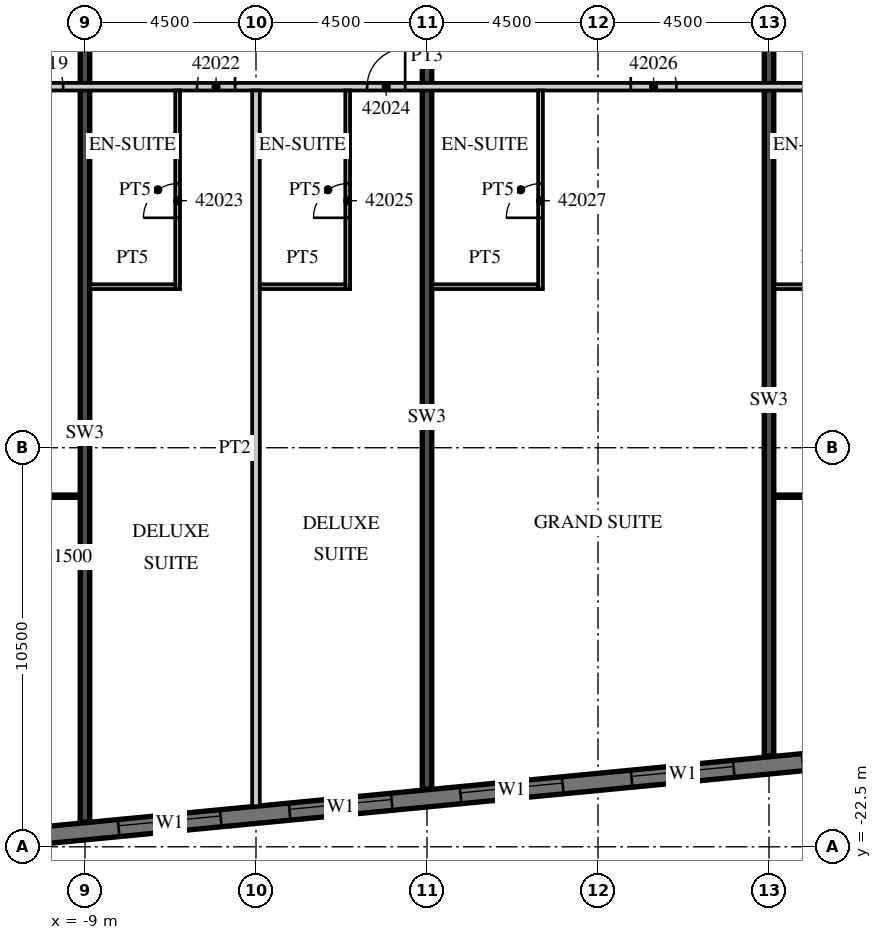
"""IFC4 building model, lengths in metres.
Left out: names, types, materials, properties, quantities, classifications, styles, units other than length and angle.
Written with IfcOpenShell. Run it as: python <this file> out.ifc"""

import sys

from ifc_helpers import new_model, si_unit, direction, frame, frame_2d, origin, place, context, subcontext, project, spatial, rectangle, extrude, element, fill, save


model = new_model("IFC4")
c1 = context("Model", 3, precision=1e-05, world=origin(), true_north=direction((0.0, 1.0)))
c2 = subcontext(c1, "Body", "Model", "MODEL_VIEW")
j1 = project(units=[si_unit("LENGTHUNIT", "METRE"), si_unit("PLANEANGLEUNIT", "RADIAN")], contexts=[c1])
p1 = place(None, origin())
s1 = spatial("IfcSite", under=j1, at=p1, CompositionType="ELEMENT")
p2 = place(p1, origin())
s2 = spatial("IfcBuilding", under=s1, at=p2, CompositionType="ELEMENT")
p3 = place(p2, frame((0.0, 0.0, 180.1)))
s3 = spatial("IfcBuildingStorey", under=s2, at=p3, CompositionType="ELEMENT", Elevation=180.1)
p4 = place(p3, frame((-9.0, -21.845, 0.0), z_axis=(0.0, 0.0, 1.0), x_axis=(0.0, 1.0, 0.0)))
e1 = element("IfcWall", 1, at=p4, inside=s3, PredefinedType="SHEAR", context=c2, shape_type="SweptSolid", body=[
    extrude(rectangle(XDim=20.445, YDim=0.25, at=frame_2d((10.223, 0.0))), origin(), (0.0, 0.0, 1.0), 3.3),
])
p5 = place(p3, frame((0.0, -20.979, 0.0), z_axis=(0.0, 0.0, 1.0), x_axis=(0.0, 1.0, 0.0)))
e2 = element("IfcWall", 2, at=p5, inside=s3, PredefinedType="SHEAR", context=c2, shape_type="SweptSolid", body=[
    extrude(rectangle(XDim=19.579, YDim=0.25, at=frame_2d((9.789, 0.0))), origin(), (0.0, 0.0, 1.0), 3.3),
])
p6 = place(p3, frame((9.0, -20.112, 0.0), z_axis=(0.0, 0.0, 1.0), x_axis=(0.0, 1.0, 0.0)))
e3 = element("IfcWall", 3, at=p6, inside=s3, PredefinedType="SHEAR", context=c2, shape_type="SweptSolid", body=[
    extrude(rectangle(XDim=18.712, YDim=0.25, at=frame_2d((9.356, 0.0))), origin(), (0.0, 0.0, 1.0), 3.3),
])
p7 = place(p3, frame((-13.521, -22.529, 0.0), z_axis=(0.0, 0.0, 1.0), x_axis=(0.995396436651, 0.095843277819, 0.0)))
e4 = element("IfcWall", 4, at=p7, inside=s3, PredefinedType="SOLIDWALL", context=c2, shape_type="SweptSolid", body=[
    extrude(rectangle(XDim=51.578, YDim=0.45, at=frame_2d((25.789, 0.0))), origin(), (0.0, 0.0, 1.0), 3.02),
])
p8 = place(p7, frame((0.91, 0.0, 0.45)))
e5 = element("IfcOpeningElement", 5, at=p8, cuts=e4, PredefinedType="OPENING", context=c2, shape_type="SweptSolid", body=[
    extrude(rectangle(XDim=2.7, YDim=2.25, at=frame_2d((1.35, 1.125))), frame((0.0, 0.235, 0.0), z_axis=(0.0, -1.0, 0.0), x_axis=(1.0, 0.0, 0.0)), (0.0, 0.0, 1.0), 0.47),
])
p9 = place(p7, frame((5.431, 0.0, 0.45)))
e6 = element("IfcOpeningElement", 6, at=p9, cuts=e4, PredefinedType="OPENING", context=c2, shape_type="SweptSolid", body=[
    extrude(rectangle(XDim=2.7, YDim=2.25, at=frame_2d((1.35, 1.125))), frame((0.0, 0.235, 0.0), z_axis=(0.0, -1.0, 0.0), x_axis=(1.0, 0.0, 0.0)), (0.0, 0.0, 1.0), 0.47),
])
p10 = place(p7, frame((9.952, 0.0, 0.45)))
e7 = element("IfcOpeningElement", 7, at=p10, cuts=e4, PredefinedType="OPENING", context=c2, shape_type="SweptSolid", body=[
    extrude(rectangle(XDim=2.7, YDim=2.25, at=frame_2d((1.35, 1.125))), frame((0.0, 0.235, 0.0), z_axis=(0.0, -1.0, 0.0), x_axis=(1.0, 0.0, 0.0)), (0.0, 0.0, 1.0), 0.47),
])
p11 = place(p7, frame((14.473, 0.0, 0.45)))
e8 = element("IfcOpeningElement", 8, at=p11, cuts=e4, PredefinedType="OPENING", context=c2, shape_type="SweptSolid", body=[
    extrude(rectangle(XDim=2.7, YDim=2.25, at=frame_2d((1.35, 1.125))), frame((0.0, 0.235, 0.0), z_axis=(0.0, -1.0, 0.0), x_axis=(1.0, 0.0, 0.0)), (0.0, 0.0, 1.0), 0.47),
])
p12 = place(p7, frame((18.994, 0.0, 0.45)))
e9 = element("IfcOpeningElement", 9, at=p12, cuts=e4, PredefinedType="OPENING", context=c2, shape_type="SweptSolid", body=[
    extrude(rectangle(XDim=2.7, YDim=2.25, at=frame_2d((1.35, 1.125))), frame((0.0, 0.235, 0.0), z_axis=(0.0, -1.0, 0.0), x_axis=(1.0, 0.0, 0.0)), (0.0, 0.0, 1.0), 0.47),
])
p13 = place(p7, frame((23.514, 0.0, 0.45)))
e10 = element("IfcOpeningElement", 10, at=p13, cuts=e4, PredefinedType="OPENING", context=c2, shape_type="SweptSolid", body=[
    extrude(rectangle(XDim=2.7, YDim=2.25, at=frame_2d((1.35, 1.125))), frame((0.0, 0.235, 0.0), z_axis=(0.0, -1.0, 0.0), x_axis=(1.0, 0.0, 0.0)), (0.0, 0.0, 1.0), 0.47),
])
p14 = place(p7, frame((28.035, 0.0, 0.45)))
e11 = element("IfcOpeningElement", 11, at=p14, cuts=e4, PredefinedType="OPENING", context=c2, shape_type="SweptSolid", body=[
    extrude(rectangle(XDim=2.7, YDim=2.25, at=frame_2d((1.35, 1.125))), frame((0.0, 0.235, 0.0), z_axis=(0.0, -1.0, 0.0), x_axis=(1.0, 0.0, 0.0)), (0.0, 0.0, 1.0), 0.47),
])
p15 = place(p7, frame((32.556, 0.0, 0.45)))
e12 = element("IfcOpeningElement", 12, at=p15, cuts=e4, PredefinedType="OPENING", context=c2, shape_type="SweptSolid", body=[
    extrude(rectangle(XDim=2.7, YDim=2.25, at=frame_2d((1.35, 1.125))), frame((0.0, 0.235, 0.0), z_axis=(0.0, -1.0, 0.0), x_axis=(1.0, 0.0, 0.0)), (0.0, 0.0, 1.0), 0.47),
])
p16 = place(p7, frame((37.077, 0.0, 0.45)))
e13 = element("IfcOpeningElement", 13, at=p16, cuts=e4, PredefinedType="OPENING", context=c2, shape_type="SweptSolid", body=[
    extrude(rectangle(XDim=2.7, YDim=2.25, at=frame_2d((1.35, 1.125))), frame((0.0, 0.235, 0.0), z_axis=(0.0, -1.0, 0.0), x_axis=(1.0, 0.0, 0.0)), (0.0, 0.0, 1.0), 0.47),
])
p17 = place(p7, frame((41.598, 0.0, 0.45)))
e14 = element("IfcOpeningElement", 14, at=p17, cuts=e4, PredefinedType="OPENING", context=c2, shape_type="SweptSolid", body=[
    extrude(rectangle(XDim=2.7, YDim=2.25, at=frame_2d((1.35, 1.125))), frame((0.0, 0.235, 0.0), z_axis=(0.0, -1.0, 0.0), x_axis=(1.0, 0.0, 0.0)), (0.0, 0.0, 1.0), 0.47),
])
p18 = place(p7, frame((46.119, 0.0, 0.45)))
e15 = element("IfcOpeningElement", 15, at=p18, cuts=e4, PredefinedType="OPENING", context=c2, shape_type="SweptSolid", body=[
    extrude(rectangle(XDim=2.7, YDim=2.25, at=frame_2d((1.35, 1.125))), frame((0.0, 0.235, 0.0), z_axis=(0.0, -1.0, 0.0), x_axis=(1.0, 0.0, 0.0)), (0.0, 0.0, 1.0), 0.47),
])
p19 = place(p3, frame((-13.5, -2.5, 0.0), z_axis=(0.0, 0.0, 1.0), x_axis=(1.0, 0.0, 0.0)))
e16 = element("IfcWall", 16, at=p19, inside=s3, PredefinedType="PARTITIONING", context=c2, shape_type="SweptSolid", body=[
    extrude(rectangle(XDim=27.0, YDim=0.2, at=frame_2d((13.5, 0.0))), origin(), (0.0, 0.0, 1.0), 3.02),
])
p20 = place(p19, frame((2.925, 0.0, 0.0)))
e17 = element("IfcOpeningElement", 17, at=p20, cuts=e16, PredefinedType="OPENING", context=c2, shape_type="SweptSolid", body=[
    extrude(rectangle(XDim=1.0, YDim=2.1, at=frame_2d((0.5, 1.05))), frame((0.0, 0.11, 0.0), z_axis=(0.0, -1.0, 0.0), x_axis=(1.0, 0.0, 0.0)), (0.0, 0.0, 1.0), 0.22),
])
p21 = place(p19, frame((7.45, 0.0, 0.0)))
e18 = element("IfcOpeningElement", 18, at=p21, cuts=e16, PredefinedType="OPENING", context=c2, shape_type="SweptSolid", body=[
    extrude(rectangle(XDim=1.0, YDim=2.1, at=frame_2d((0.5, 1.05))), frame((0.0, 0.11, 0.0), z_axis=(0.0, -1.0, 0.0), x_axis=(1.0, 0.0, 0.0)), (0.0, 0.0, 1.0), 0.22),
])
p22 = place(p19, frame((11.925, 0.0, 0.0)))
e19 = element("IfcOpeningElement", 19, at=p22, cuts=e16, PredefinedType="OPENING", context=c2, shape_type="SweptSolid", body=[
    extrude(rectangle(XDim=1.0, YDim=2.1, at=frame_2d((0.5, 1.05))), frame((0.0, 0.11, 0.0), z_axis=(0.0, -1.0, 0.0), x_axis=(1.0, 0.0, 0.0)), (0.0, 0.0, 1.0), 0.22),
])
p23 = place(p19, frame((18.862, 0.0, 0.0)))
e20 = element("IfcOpeningElement", 20, at=p23, cuts=e16, PredefinedType="OPENING", context=c2, shape_type="SweptSolid", body=[
    extrude(rectangle(XDim=1.2, YDim=2.1, at=frame_2d((0.6, 1.05))), frame((0.0, 0.11, 0.0), z_axis=(0.0, -1.0, 0.0), x_axis=(1.0, 0.0, 0.0)), (0.0, 0.0, 1.0), 0.22),
])
p24 = place(p19, frame((25.425, 0.0, 0.0)))
e21 = element("IfcOpeningElement", 21, at=p24, cuts=e16, PredefinedType="OPENING", context=c2, shape_type="SweptSolid", body=[
    extrude(rectangle(XDim=1.0, YDim=2.1, at=frame_2d((0.5, 1.05))), frame((0.0, 0.11, 0.0), z_axis=(0.0, -1.0, 0.0), x_axis=(1.0, 0.0, 0.0)), (0.0, 0.0, 1.0), 0.22),
])
p25 = place(p3, frame((-13.4, -13.275, 0.0), z_axis=(0.0, 0.0, 1.0), x_axis=(1.0, 0.0, 0.0)))
e22 = element("IfcWall", 22, at=p25, inside=s3, PredefinedType="PARTITIONING", context=c2, shape_type="SweptSolid", body=[
    extrude(rectangle(XDim=4.275, YDim=0.1, at=frame_2d((2.137, 0.0))), origin(), (0.0, 0.0, 1.0), 3.02),
])
p26 = place(p25, frame((1.988, 0.0, 0.0)))
e23 = element("IfcOpeningElement", 23, at=p26, cuts=e22, PredefinedType="OPENING", context=c2, shape_type="SweptSolid", body=[
    extrude(rectangle(XDim=1.5, YDim=2.1, at=frame_2d((0.75, 1.05))), frame((0.0, 0.06, 0.0), z_axis=(0.0, -1.0, 0.0), x_axis=(1.0, 0.0, 0.0)), (0.0, 0.0, 1.0), 0.12),
])
p27 = place(p3, frame((-4.5, -21.434, 0.0), z_axis=(0.0, 0.0, 1.0), x_axis=(0.0, 1.0, 0.0)))
e24 = element("IfcWall", 24, at=p27, inside=s3, PredefinedType="PARTITIONING", context=c2, shape_type="SweptSolid", body=[
    extrude(rectangle(XDim=18.834, YDim=0.2, at=frame_2d((9.417, 0.0))), origin(), (0.0, 0.0, 1.0), 3.02),
])
p28 = place(p3, frame((-6.562, -7.825, 0.0), z_axis=(0.0, 0.0, 1.0), x_axis=(0.0, 1.0, 0.0)))
e25 = element("IfcWall", 25, at=p28, inside=s3, PredefinedType="PARTITIONING", context=c2, shape_type="SweptSolid", body=[
    extrude(rectangle(XDim=5.225, YDim=0.125, at=frame_2d((2.612, 0.0))), origin(), (0.0, 0.0, 1.0), 3.02),
])
p29 = place(p28, frame((1.875, 0.0, 0.0)))
e26 = element("IfcOpeningElement", 26, at=p29, cuts=e25, PredefinedType="OPENING", context=c2, shape_type="SweptSolid", body=[
    extrude(rectangle(XDim=0.9, YDim=2.1, at=frame_2d((0.45, 1.05))), frame((0.0, 0.073, 0.0), z_axis=(0.0, -1.0, 0.0), x_axis=(1.0, 0.0, 0.0)), (0.0, 0.0, 1.0), 0.145),
])
p30 = place(p3, frame((-8.875, -7.762, 0.0), z_axis=(0.0, 0.0, 1.0), x_axis=(1.0, 0.0, 0.0)))
e27 = element("IfcWall", 27, at=p30, inside=s3, PredefinedType="PARTITIONING", context=c2, shape_type="SweptSolid", body=[
    extrude(rectangle(XDim=2.25, YDim=0.125, at=frame_2d((1.125, 0.0))), origin(), (0.0, 0.0, 1.0), 3.02),
])
p31 = place(p3, frame((-2.087, -7.825, 0.0), z_axis=(0.0, 0.0, 1.0), x_axis=(0.0, 1.0, 0.0)))
e28 = element("IfcWall", 28, at=p31, inside=s3, PredefinedType="PARTITIONING", context=c2, shape_type="SweptSolid", body=[
    extrude(rectangle(XDim=5.225, YDim=0.125, at=frame_2d((2.612, 0.0))), origin(), (0.0, 0.0, 1.0), 3.02),
])
p32 = place(p31, frame((1.875, 0.0, 0.0)))
e29 = element("IfcOpeningElement", 29, at=p32, cuts=e28, PredefinedType="OPENING", context=c2, shape_type="SweptSolid", body=[
    extrude(rectangle(XDim=0.9, YDim=2.1, at=frame_2d((0.45, 1.05))), frame((0.0, 0.073, 0.0), z_axis=(0.0, -1.0, 0.0), x_axis=(1.0, 0.0, 0.0)), (0.0, 0.0, 1.0), 0.145),
])
p33 = place(p3, frame((-4.4, -7.762, 0.0), z_axis=(0.0, 0.0, 1.0), x_axis=(1.0, 0.0, 0.0)))
e30 = element("IfcWall", 30, at=p33, inside=s3, PredefinedType="PARTITIONING", context=c2, shape_type="SweptSolid", body=[
    extrude(rectangle(XDim=2.25, YDim=0.125, at=frame_2d((1.125, 0.0))), origin(), (0.0, 0.0, 1.0), 3.02),
])
p34 = place(p3, frame((2.987, -7.825, 0.0), z_axis=(0.0, 0.0, 1.0), x_axis=(0.0, 1.0, 0.0)))
e31 = element("IfcWall", 31, at=p34, inside=s3, PredefinedType="PARTITIONING", context=c2, shape_type="SweptSolid", body=[
    extrude(rectangle(XDim=5.225, YDim=0.125, at=frame_2d((2.612, 0.0))), origin(), (0.0, 0.0, 1.0), 3.02),
])
p35 = place(p34, frame((1.875, 0.0, 0.0)))
e32 = element("IfcOpeningElement", 32, at=p35, cuts=e31, PredefinedType="OPENING", context=c2, shape_type="SweptSolid", body=[
    extrude(rectangle(XDim=0.9, YDim=2.1, at=frame_2d((0.45, 1.05))), frame((0.0, 0.073, 0.0), z_axis=(0.0, -1.0, 0.0), x_axis=(1.0, 0.0, 0.0)), (0.0, 0.0, 1.0), 0.145),
])
p36 = place(p3, frame((0.125, -7.762, 0.0), z_axis=(0.0, 0.0, 1.0), x_axis=(1.0, 0.0, 0.0)))
e33 = element("IfcWall", 33, at=p36, inside=s3, PredefinedType="PARTITIONING", context=c2, shape_type="SweptSolid", body=[
    extrude(rectangle(XDim=2.8, YDim=0.125, at=frame_2d((1.4, 0.0))), origin(), (0.0, 0.0, 1.0), 3.02),
])
p37 = place(p3, frame((9.125, -7.762, 0.0), z_axis=(0.0, 0.0, 1.0), x_axis=(1.0, 0.0, 0.0)))
e34 = element("IfcWall", 34, at=p37, inside=s3, PredefinedType="PARTITIONING", context=c2, shape_type="SweptSolid", body=[
    extrude(rectangle(XDim=2.25, YDim=0.125, at=frame_2d((1.125, 0.0))), origin(), (0.0, 0.0, 1.0), 3.02),
])
p38 = place(p3, frame((9.125, -13.275, 0.0), z_axis=(0.0, 0.0, 1.0), x_axis=(1.0, 0.0, 0.0)))
e35 = element("IfcWall", 35, at=p38, inside=s3, PredefinedType="PARTITIONING", context=c2, shape_type="SweptSolid", body=[
    extrude(rectangle(XDim=4.275, YDim=0.1, at=frame_2d((2.137, 0.0))), origin(), (0.0, 0.0, 1.0), 3.02),
])
p39 = place(p38, frame((0.787, 0.0, 0.0)))
e36 = element("IfcOpeningElement", 36, at=p39, cuts=e35, PredefinedType="OPENING", context=c2, shape_type="SweptSolid", body=[
    extrude(rectangle(XDim=1.5, YDim=2.1, at=frame_2d((0.75, 1.05))), frame((0.0, 0.06, 0.0), z_axis=(0.0, -1.0, 0.0), x_axis=(1.0, 0.0, 0.0)), (0.0, 0.0, 1.0), 0.12),
])
p40 = place(p9, origin())
e37 = element("IfcWindow", 37, at=p40, inside=s3, PartitioningType="SINGLE_PANEL", PredefinedType="WINDOW", context=c2, shape_type="SweptSolid", body=[
    extrude(rectangle(XDim=2.7, YDim=2.25, at=frame_2d((1.35, 1.125))), frame((0.0, 0.09, 0.0), z_axis=(0.0, -1.0, 0.0), x_axis=(1.0, 0.0, 0.0)), (0.0, 0.0, 1.0), 0.06),
])
fill(e6, e37)
p41 = place(p10, origin())
e38 = element("IfcWindow", 38, at=p41, inside=s3, PartitioningType="SINGLE_PANEL", PredefinedType="WINDOW", context=c2, shape_type="SweptSolid", body=[
    extrude(rectangle(XDim=2.7, YDim=2.25, at=frame_2d((1.35, 1.125))), frame((0.0, 0.09, 0.0), z_axis=(0.0, -1.0, 0.0), x_axis=(1.0, 0.0, 0.0)), (0.0, 0.0, 1.0), 0.06),
])
fill(e7, e38)
p42 = place(p11, origin())
e39 = element("IfcWindow", 39, at=p42, inside=s3, PartitioningType="SINGLE_PANEL", PredefinedType="WINDOW", context=c2, shape_type="SweptSolid", body=[
    extrude(rectangle(XDim=2.7, YDim=2.25, at=frame_2d((1.35, 1.125))), frame((0.0, 0.09, 0.0), z_axis=(0.0, -1.0, 0.0), x_axis=(1.0, 0.0, 0.0)), (0.0, 0.0, 1.0), 0.06),
])
fill(e8, e39)
p43 = place(p12, origin())
e40 = element("IfcWindow", 40, at=p43, inside=s3, PartitioningType="SINGLE_PANEL", PredefinedType="WINDOW", context=c2, shape_type="SweptSolid", body=[
    extrude(rectangle(XDim=2.7, YDim=2.25, at=frame_2d((1.35, 1.125))), frame((0.0, 0.09, 0.0), z_axis=(0.0, -1.0, 0.0), x_axis=(1.0, 0.0, 0.0)), (0.0, 0.0, 1.0), 0.06),
])
fill(e9, e40)
p44 = place(p20, origin())
e41 = element("IfcDoor", 41, at=p44, inside=s3, OperationType="SINGLE_SWING_LEFT", PredefinedType="DOOR", context=c2, shape_type="SweptSolid", body=[
    extrude(rectangle(XDim=1.0, YDim=2.1, at=frame_2d((0.5, 1.05))), frame((0.0, 0.025, 0.0), z_axis=(0.0, -1.0, 0.0), x_axis=(1.0, 0.0, 0.0)), (0.0, 0.0, 1.0), 0.05),
])
fill(e17, e41)
p45 = place(p21, origin())
e42 = element("IfcDoor", 42, at=p45, inside=s3, OperationType="SINGLE_SWING_RIGHT", PredefinedType="DOOR", context=c2, shape_type="SweptSolid", body=[
    extrude(rectangle(XDim=1.0, YDim=2.1, at=frame_2d((0.5, 1.05))), frame((0.0, 0.025, 0.0), z_axis=(0.0, -1.0, 0.0), x_axis=(1.0, 0.0, 0.0)), (0.0, 0.0, 1.0), 0.05),
])
fill(e18, e42)
p46 = place(p29, origin())
e43 = element("IfcDoor", 43, at=p46, inside=s3, OperationType="SINGLE_SWING_LEFT", PredefinedType="DOOR", context=c2, shape_type="SweptSolid", body=[
    extrude(rectangle(XDim=0.9, YDim=2.1, at=frame_2d((0.45, 1.05))), frame((0.0, 0.025, 0.0), z_axis=(0.0, -1.0, 0.0), x_axis=(1.0, 0.0, 0.0)), (0.0, 0.0, 1.0), 0.05),
])
fill(e26, e43)
p47 = place(p22, origin())
e44 = element("IfcDoor", 44, at=p47, inside=s3, OperationType="SINGLE_SWING_RIGHT", PredefinedType="DOOR", context=c2, shape_type="SweptSolid", body=[
    extrude(rectangle(XDim=1.0, YDim=2.1, at=frame_2d((0.5, 1.05))), frame((0.0, 0.025, 0.0), z_axis=(0.0, -1.0, 0.0), x_axis=(1.0, 0.0, 0.0)), (0.0, 0.0, 1.0), 0.05),
])
fill(e19, e44)
p48 = place(p32, origin())
e45 = element("IfcDoor", 45, at=p48, inside=s3, OperationType="SINGLE_SWING_LEFT", PredefinedType="DOOR", context=c2, shape_type="SweptSolid", body=[
    extrude(rectangle(XDim=0.9, YDim=2.1, at=frame_2d((0.45, 1.05))), frame((0.0, 0.025, 0.0), z_axis=(0.0, -1.0, 0.0), x_axis=(1.0, 0.0, 0.0)), (0.0, 0.0, 1.0), 0.05),
])
fill(e29, e45)
p49 = place(p23, origin())
e46 = element("IfcDoor", 46, at=p49, inside=s3, OperationType="SINGLE_SWING_LEFT", PredefinedType="DOOR", context=c2, shape_type="SweptSolid", body=[
    extrude(rectangle(XDim=1.2, YDim=2.1, at=frame_2d((0.6, 1.05))), frame((0.0, 0.025, 0.0), z_axis=(0.0, -1.0, 0.0), x_axis=(1.0, 0.0, 0.0)), (0.0, 0.0, 1.0), 0.05),
])
fill(e20, e46)
p50 = place(p35, origin())
e47 = element("IfcDoor", 47, at=p50, inside=s3, OperationType="SINGLE_SWING_LEFT", PredefinedType="DOOR", context=c2, shape_type="SweptSolid", body=[
    extrude(rectangle(XDim=0.9, YDim=2.1, at=frame_2d((0.45, 1.05))), frame((0.0, 0.025, 0.0), z_axis=(0.0, -1.0, 0.0), x_axis=(1.0, 0.0, 0.0)), (0.0, 0.0, 1.0), 0.05),
])
fill(e32, e47)
save(model, sys.argv[1])
